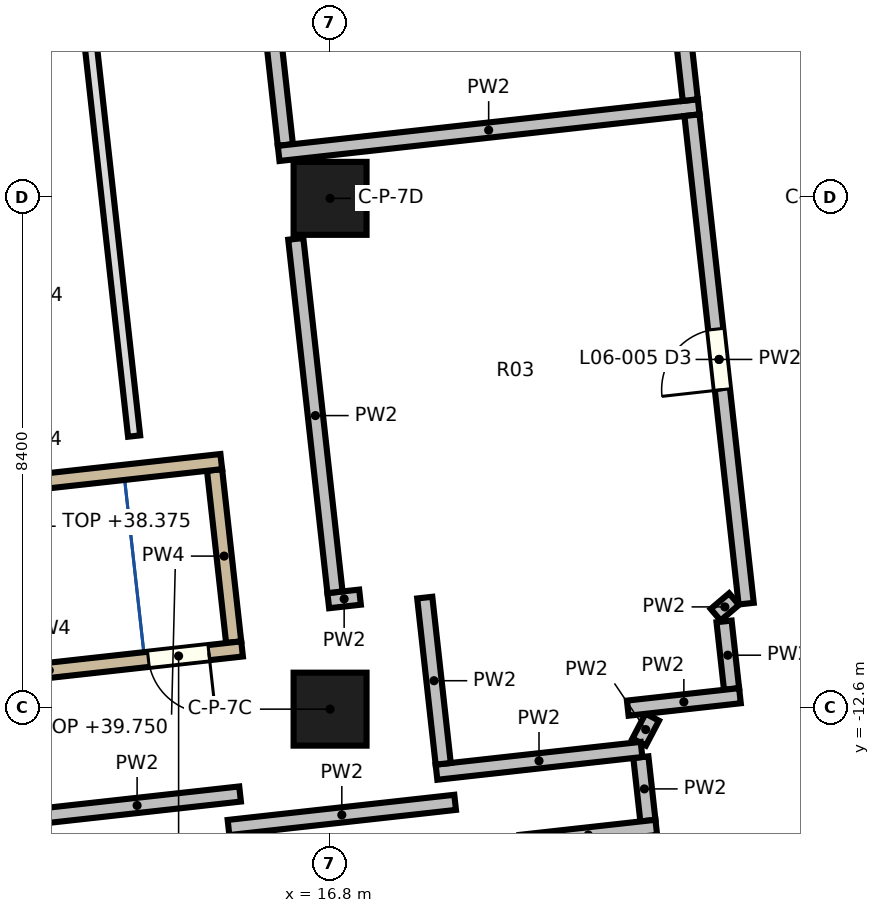
"""IFC4 building model, lengths in metres.
Left out: names, types, materials, properties, quantities, classifications, styles, units other than length and angle.
Written with IfcOpenShell. Run it as: python <this file> out.ifc"""

import sys

from ifc_helpers import new_model, si_unit, direction, frame, frame_2d, origin, origin_2d, place, context, subcontext, project, spatial, rectangle, extrude, element, fill, save


model = new_model("IFC4")
c1 = context("Model", 3, precision=1e-05, world=origin(), true_north=direction((0.0, 1.0)))
c2 = subcontext(c1, "Body", "Model", "MODEL_VIEW")
j1 = project(units=[si_unit("LENGTHUNIT", "METRE"), si_unit("PLANEANGLEUNIT", "RADIAN")], contexts=[c1])
p1 = place(None, origin())
s1 = spatial("IfcSite", under=j1, at=p1, CompositionType="ELEMENT")
p2 = place(p1, origin())
s2 = spatial("IfcBuilding", under=s1, at=p2, CompositionType="ELEMENT")
p3 = place(p2, frame((0.0, 0.0, 37.0)))
s3 = spatial("IfcBuildingStorey", under=s2, at=p3, CompositionType="ELEMENT", Elevation=37.0)
for number, where, z_axis, x_axis in (
    (1, (16.8, -12.6, 0.0), (0.0, 0.0, 1.0), (1.0, 0.0, 0.0)),
    (2, (16.8, -4.2, 0.0), (0.0, 0.0, 1.0), (1.0, 0.0, 0.0)),
):
    element("IfcColumn", number, at=place(p3, frame(where, z_axis=z_axis, x_axis=x_axis)), inside=s3, PredefinedType="COLUMN", context=c2, shape_type="SweptSolid", body=[
        extrude(rectangle(XDim=1.2, YDim=1.2, at=origin_2d()), origin(), (0.0, 0.0, 1.0), 4.3),
    ])
p4 = place(p3, frame((16.771, -10.816, 0.0), z_axis=(0.0, 0.0, 1.0), x_axis=(0.993906401223, 0.110227336027, 0.0)))
e3 = element("IfcWall", 3, at=p4, inside=s3, PredefinedType="PARTITIONING", context=c2, shape_type="SweptSolid", body=[
    extrude(rectangle(XDim=0.525, YDim=0.25, at=frame_2d((0.262, 0.0))), origin(), (0.0, 0.0, 1.0), 4.3),
])
p5 = place(p3, frame((13.577, -8.109, 0.0), z_axis=(0.0, 0.0, 1.0), x_axis=(-0.110309246237, 0.993897313707, 0.0)))
e4 = element("IfcWall", 4, at=p5, inside=s3, PredefinedType="PARTITIONING", context=c2, shape_type="SweptSolid", body=[
    extrude(rectangle(XDim=17.969, YDim=0.2, at=frame_2d((8.985, 0.0))), origin(), (0.0, 0.0, 1.0), 4.3),
])
p6 = place(p3, frame((12.159, -17.541, 0.0), z_axis=(0.0, 0.0, 1.0), x_axis=(-0.110308521992, 0.993897394089, 0.0)))
e5 = element("IfcWall", 5, at=p6, inside=s3, PredefinedType="PARTITIONING", context=c2, shape_type="SweptSolid", body=[
    extrude(rectangle(XDim=3.05, YDim=0.25, at=frame_2d((1.525, 0.0))), origin(), (0.0, 0.0, 1.0), 4.3),
])
p7 = place(p3, frame((22.027, -14.433, 0.0), z_axis=(0.0, 0.0, 1.0), x_axis=(-0.110201865026, 0.993909225707, 0.0)))
e6 = element("IfcWall", 6, at=p7, inside=s3, PredefinedType="PARTITIONING", context=c2, shape_type="SweptSolid", body=[
    extrude(rectangle(XDim=1.05, YDim=0.25, at=frame_2d((0.525, 0.0))), origin(), (0.0, 0.0, 1.0), 4.3),
])
p8 = place(p3, frame((21.883, -13.141, 0.0), z_axis=(0.0, 0.0, 1.0), x_axis=(0.464223811287, 0.885717930853, 0.0)))
e7 = element("IfcWall", 7, at=p8, inside=s3, PredefinedType="PARTITIONING", context=c2, shape_type="SweptSolid", body=[
    extrude(rectangle(XDim=0.463, YDim=0.25, at=frame_2d((0.231, 0.0))), origin(), (0.0, 0.0, 1.0), 4.3),
])
p9 = place(p3, frame((11.933, -14.371, 0.0), z_axis=(0.0, 0.0, 1.0), x_axis=(0.993894215195, 0.110337160568, 0.0)))
e8 = element("IfcWall", 8, at=p9, inside=s3, PredefinedType="PARTITIONING", context=c2, shape_type="SweptSolid", body=[
    extrude(rectangle(XDim=3.407, YDim=0.25, at=frame_2d((1.704, 0.0))), origin(), (0.0, 0.0, 1.0), 4.3),
])
p10 = place(p3, frame((18.55, -13.637, 0.0), z_axis=(0.0, 0.0, 1.0), x_axis=(0.993896015074, 0.110320946427, 0.0)))
e9 = element("IfcWall", 9, at=p10, inside=s3, PredefinedType="PARTITIONING", context=c2, shape_type="SweptSolid", body=[
    extrude(rectangle(XDim=3.393, YDim=0.25, at=frame_2d((1.696, 0.0))), origin(), (0.0, 0.0, 1.0), 4.3),
])
p11 = place(p3, frame((18.66, -13.499, 0.0), z_axis=(0.0, 0.0, 1.0), x_axis=(-0.110265872382, 0.993902126664, 0.0)))
e10 = element("IfcWall", 10, at=p11, inside=s3, PredefinedType="PARTITIONING", context=c2, shape_type="SweptSolid", body=[
    extrude(rectangle(XDim=2.75, YDim=0.25, at=frame_2d((1.375, 0.0))), origin(), (0.0, 0.0, 1.0), 4.3),
])
p12 = place(p3, frame((16.881, -10.678, 0.0), z_axis=(0.0, 0.0, 1.0), x_axis=(-0.110307797837, 0.993897474459, 0.0)))
e11 = element("IfcWall", 11, at=p12, inside=s3, PredefinedType="PARTITIONING", context=c2, shape_type="SweptSolid", body=[
    extrude(rectangle(XDim=5.847, YDim=0.25, at=frame_2d((2.924, 0.0))), origin(), (0.0, 0.0, 1.0), 4.3),
])
p13 = place(p3, frame((16.065, -3.323, 0.0), z_axis=(0.0, 0.0, 1.0), x_axis=(-0.110345783203, 0.993893257915, 0.0)))
e12 = element("IfcWall", 12, at=p13, inside=s3, PredefinedType="PARTITIONING", context=c2, shape_type="SweptSolid", body=[
    extrude(rectangle(XDim=3.75, YDim=0.25, at=frame_2d((1.875, 0.0))), origin(), (0.0, 0.0, 1.0), 4.3),
])
p14 = place(p3, frame((15.954, -3.461, 0.0), z_axis=(0.0, 0.0, 1.0), x_axis=(0.993898291102, 0.110300439459, 0.0)))
e13 = element("IfcWall", 13, at=p14, inside=s3, PredefinedType="PARTITIONING", context=c2, shape_type="SweptSolid", body=[
    extrude(rectangle(XDim=6.95, YDim=0.25, at=frame_2d((3.475, 0.0))), origin(), (0.0, 0.0, 1.0), 4.3),
])
p15 = place(p3, frame((23.643, -10.865, 0.0), z_axis=(0.0, 0.0, 1.0), x_axis=(-0.110318798785, 0.993896253456, 0.0)))
e14 = element("IfcWall", 14, at=p15, inside=s3, PredefinedType="PARTITIONING", context=c2, shape_type="SweptSolid", body=[
    extrude(rectangle(XDim=8.082, YDim=0.25, at=frame_2d((4.041, 0.0))), origin(), (0.0, 0.0, 1.0), 4.3),
])
p16 = place(p15, frame((3.541, 0.0, 0.0)))
e15 = element("IfcOpeningElement", 15, at=p16, cuts=e14, PredefinedType="OPENING", context=c2, shape_type="SweptSolid", body=[
    extrude(rectangle(XDim=1.0, YDim=2.1, at=frame_2d((0.5, 1.05))), frame((0.0, 0.135, 0.0), z_axis=(0.0, -1.0, 0.0), x_axis=(1.0, 0.0, 0.0)), (0.0, 0.0, 1.0), 0.27),
])
p17 = place(p3, frame((22.724, -2.584, 0.0), z_axis=(0.0, 0.0, 1.0), x_axis=(-0.110288610559, 0.993899603773, 0.0)))
e16 = element("IfcWall", 16, at=p17, inside=s3, PredefinedType="PARTITIONING", context=c2, shape_type="SweptSolid", body=[
    extrude(rectangle(XDim=3.75, YDim=0.25, at=frame_2d((1.875, 0.0))), origin(), (0.0, 0.0, 1.0), 4.3),
])
p18 = place(p3, frame((23.141, -11.047, 0.0), z_axis=(0.0, 0.0, 1.0), x_axis=(0.762334203963, 0.647183560876, 0.0)))
e17 = element("IfcWall", 17, at=p18, inside=s3, PredefinedType="PARTITIONING", context=c2, shape_type="SweptSolid", body=[
    extrude(rectangle(XDim=0.396, YDim=0.25, at=frame_2d((0.198, 0.0))), origin(), (0.0, 0.0, 1.0), 4.3),
])
p19 = place(p3, frame((23.403, -12.268, 0.0), z_axis=(0.0, 0.0, 1.0), x_axis=(-0.110479453985, 0.99387840818, 0.0)))
e18 = element("IfcWall", 18, at=p19, inside=s3, PredefinedType="PARTITIONING", context=c2, shape_type="SweptSolid", body=[
    extrude(rectangle(XDim=1.118, YDim=0.25, at=frame_2d((0.559, 0.0))), origin(), (0.0, 0.0, 1.0), 4.3),
])
p20 = place(p3, frame((21.696, -12.583, 0.0), z_axis=(0.0, 0.0, 1.0), x_axis=(0.993893354283, 0.11034491521, 0.0)))
e19 = element("IfcWall", 19, at=p20, inside=s3, PredefinedType="PARTITIONING", context=c2, shape_type="SweptSolid", body=[
    extrude(rectangle(XDim=1.856, YDim=0.25, at=frame_2d((0.928, 0.0))), origin(), (0.0, 0.0, 1.0), 4.3),
])
p21 = place(p3, frame((19.928, -14.792, 0.0), z_axis=(0.0, 0.0, 1.0), x_axis=(0.993891672249, 0.110360064491, 0.0)))
e20 = element("IfcWall", 20, at=p21, inside=s3, PredefinedType="PARTITIONING", context=c2, shape_type="SweptSolid", body=[
    extrude(rectangle(XDim=2.25, YDim=0.25, at=frame_2d((1.125, 0.0))), origin(), (0.0, 0.0, 1.0), 4.3),
])
p22 = place(p3, frame((15.129, -14.546, 0.0), z_axis=(0.0, 0.0, 1.0), x_axis=(0.993900395612, 0.110281474433, 0.0)))
e21 = element("IfcWall", 21, at=p22, inside=s3, PredefinedType="PARTITIONING", context=c2, shape_type="SweptSolid", body=[
    extrude(rectangle(XDim=3.75, YDim=0.25, at=frame_2d((1.875, 0.0))), origin(), (0.0, 0.0, 1.0), 4.3),
])
p23 = place(p3, frame((14.9, -8.667, 0.0), z_axis=(0.0, 0.0, 1.0), x_axis=(0.110243491536, -0.993904609394, 0.0)))
e22 = element("IfcWall", 22, at=p23, inside=s3, PredefinedType="SOLIDWALL", context=c2, shape_type="SweptSolid", body=[
    extrude(rectangle(XDim=2.85, YDim=0.25, at=frame_2d((1.425, 0.0))), origin(), (0.0, 0.0, 1.0), 4.3),
])
p24 = place(p3, frame((15.353, -11.61, 0.0), z_axis=(0.0, 0.0, 1.0), x_axis=(-0.993898660621, -0.110297109738, 0.0)))
e23 = element("IfcWall", 23, at=p24, inside=s3, PredefinedType="SOLIDWALL", context=c2, shape_type="SweptSolid", body=[
    extrude(rectangle(XDim=6.379, YDim=0.25, at=frame_2d((3.189, 0.0))), origin(), (0.0, 0.0, 1.0), 4.3),
])
p25 = place(p24, frame((0.55, 0.0, 0.0)))
e24 = element("IfcOpeningElement", 24, at=p25, cuts=e23, PredefinedType="OPENING", context=c2, shape_type="SweptSolid", body=[
    extrude(rectangle(XDim=1.0, YDim=2.1, at=frame_2d((0.5, 1.05))), frame((0.0, 0.135, 0.0), z_axis=(0.0, -1.0, 0.0), x_axis=(1.0, 0.0, 0.0)), (0.0, 0.0, 1.0), 0.27),
])
p26 = place(p3, frame((9.047, -9.19, 0.0), z_axis=(0.0, 0.0, 1.0), x_axis=(0.993897125329, 0.110310943534, 0.0)))
e25 = element("IfcWall", 25, at=p26, inside=s3, PredefinedType="SOLIDWALL", context=c2, shape_type="SweptSolid", body=[
    extrude(rectangle(XDim=6.0, YDim=0.25, at=frame_2d((3.0, 0.0))), origin(), (0.0, 0.0, 1.0), 4.3),
])
p27 = place(p16, origin())
e26 = element("IfcDoor", 26, at=p27, inside=s3, PredefinedType="DOOR", context=c2, shape_type="SweptSolid", body=[
    extrude(rectangle(XDim=1.0, YDim=2.1, at=frame_2d((0.5, 1.05))), frame((0.0, 0.025, 0.0), z_axis=(0.0, -1.0, 0.0), x_axis=(1.0, 0.0, 0.0)), (0.0, 0.0, 1.0), 0.05),
])
fill(e15, e26)
p28 = place(p25, origin())
e27 = element("IfcDoor", 27, at=p28, inside=s3, PredefinedType="DOOR", context=c2, shape_type="SweptSolid", body=[
    extrude(rectangle(XDim=1.0, YDim=2.1, at=frame_2d((0.5, 1.05))), frame((0.0, 0.025, 0.0), z_axis=(0.0, -1.0, 0.0), x_axis=(1.0, 0.0, 0.0)), (0.0, 0.0, 1.0), 0.05),
])
fill(e24, e27)
save(model, sys.argv[1])
